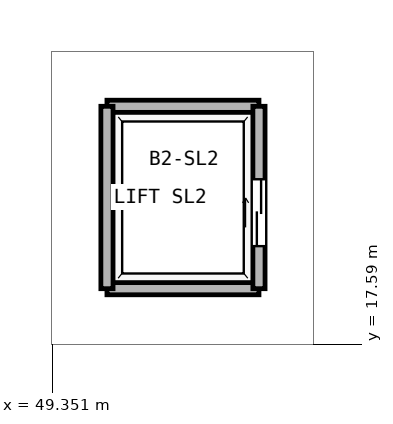
"""IFC4 building model, lengths in metres.
Left out: names, types, materials, properties, quantities, classifications, styles, units other than length and angle.
Written with IfcOpenShell. Run it as: python <this file> out.ifc"""

import sys

from ifc_helpers import new_model, si_unit, direction, frame, frame_2d, origin, place, context, subcontext, project, spatial, rectangle, extrude, element, fill, save


model = new_model("IFC4")
c1 = context("Model", 3, precision=1e-05, world=origin(), true_north=direction((0.0, 1.0)))
c2 = subcontext(c1, "Body", "Model", "MODEL_VIEW")
j1 = project(units=[si_unit("LENGTHUNIT", "METRE"), si_unit("PLANEANGLEUNIT", "RADIAN")], contexts=[c1])
p1 = place(None, origin())
s1 = spatial("IfcSite", under=j1, at=p1, CompositionType="ELEMENT")
p2 = place(p1, origin())
s2 = spatial("IfcBuilding", under=s1, at=p2, CompositionType="ELEMENT")
p3 = place(p2, frame((0.0, 0.0, -8.4)))
s3 = spatial("IfcBuildingStorey", under=s2, at=p3, CompositionType="ELEMENT", Elevation=-8.4)
for number, where, z_axis, x_axis in (
    (1, (50.25, 18.5, 0.0), (0.0, 0.0, 1.0), (1.0, 0.0, 0.0)),
    (2, (50.25, 21.5, 0.0), (0.0, 0.0, 1.0), (1.0, 0.0, 0.0)),
):
    element("IfcWall", number, at=place(p3, frame(where, z_axis=z_axis, x_axis=x_axis)), inside=s3, PredefinedType="PARTITIONING", context=c2, shape_type="SweptSolid", body=[
        extrude(rectangle(XDim=2.5, YDim=0.2, at=frame_2d((1.25, 0.0))), origin(), (0.0, 0.0, 1.0), 3.88),
    ])
p4 = place(p3, frame((50.25, 18.5, 0.0), z_axis=(0.0, 0.0, 1.0), x_axis=(0.0, 1.0, 0.0)))
e3 = element("IfcWall", 3, at=p4, inside=s3, PredefinedType="PARTITIONING", context=c2, shape_type="SweptSolid", body=[
    extrude(rectangle(XDim=3.0, YDim=0.2, at=frame_2d((1.5, 0.0))), origin(), (0.0, 0.0, 1.0), 3.88),
])
p5 = place(p3, frame((52.75, 18.5, 0.0), z_axis=(0.0, 0.0, 1.0), x_axis=(0.0, 1.0, 0.0)))
e4 = element("IfcWall", 4, at=p5, inside=s3, PredefinedType="PARTITIONING", context=c2, shape_type="SweptSolid", body=[
    extrude(rectangle(XDim=3.0, YDim=0.2, at=frame_2d((1.5, 0.0))), origin(), (0.0, 0.0, 1.0), 3.88),
])
p6 = place(p5, frame((0.7, 0.0, 0.0)))
e5 = element("IfcOpeningElement", 5, at=p6, cuts=e4, PredefinedType="OPENING", context=c2, shape_type="SweptSolid", body=[
    extrude(rectangle(XDim=1.1, YDim=2.25, at=frame_2d((0.55, 1.125))), frame((0.0, 0.11, 0.0), z_axis=(0.0, -1.0, 0.0), x_axis=(1.0, 0.0, 0.0)), (0.0, 0.0, 1.0), 0.22),
])
p7 = place(p6, origin())
e6 = element("IfcDoor", 6, at=p7, inside=s3, OperationType="DOUBLE_DOOR_SLIDING", PredefinedType="DOOR", context=c2, shape_type="SweptSolid", body=[
    extrude(rectangle(XDim=1.1, YDim=2.25, at=frame_2d((0.55, 1.125))), frame((0.0, 0.025, 0.0), z_axis=(0.0, -1.0, 0.0), x_axis=(1.0, 0.0, 0.0)), (0.0, 0.0, 1.0), 0.05),
])
fill(e5, e6)
save(model, sys.argv[1])
